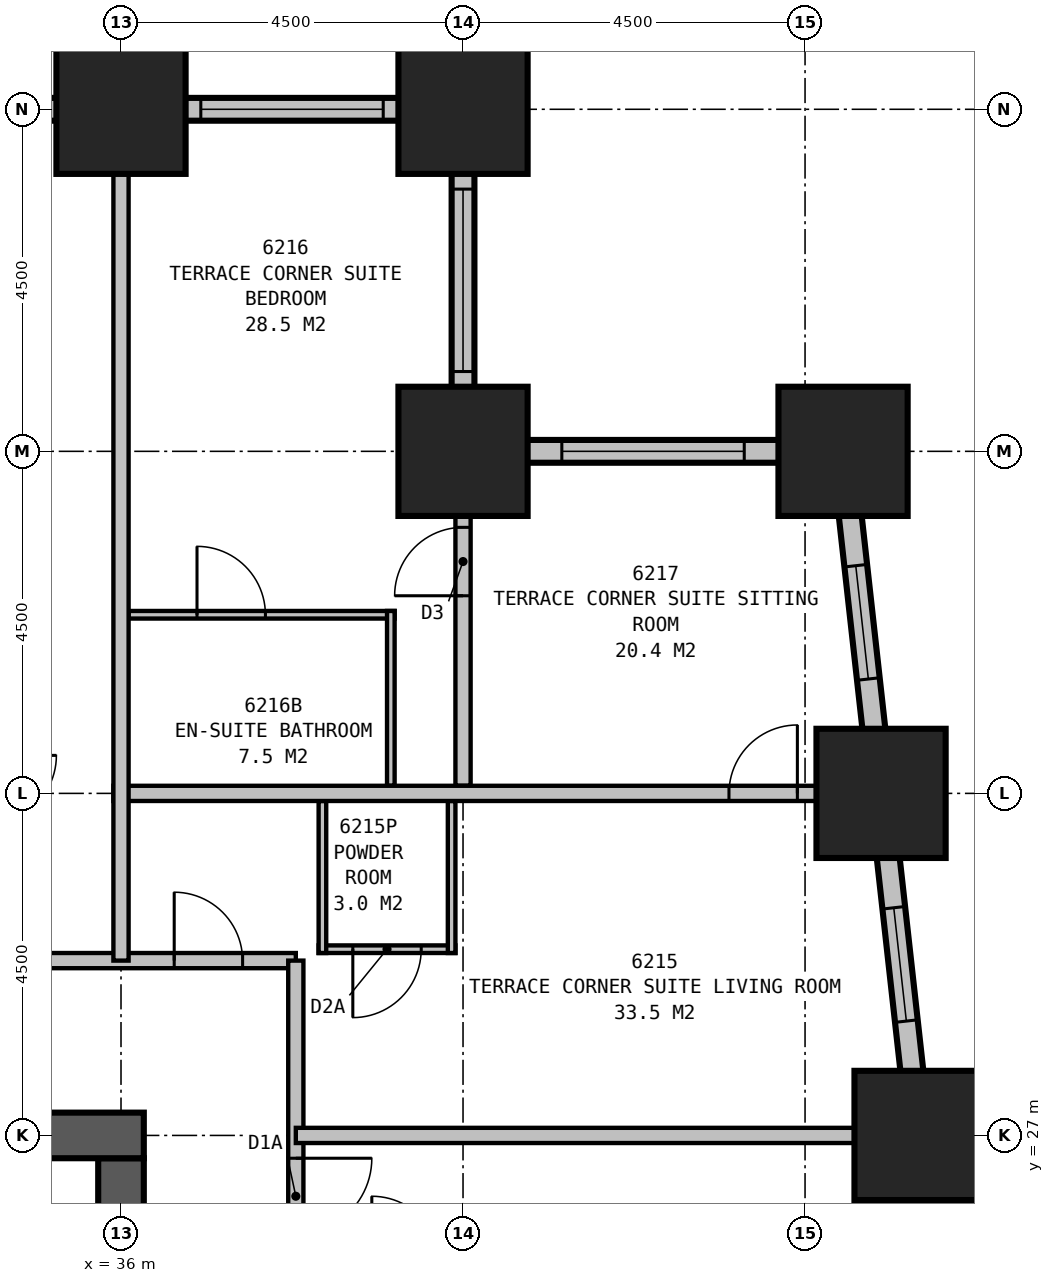
"""IFC4 building model, lengths in metres.
Left out: names, types, materials, properties, quantities, classifications, styles, units other than length and angle.
Written with IfcOpenShell. Run it as: python <this file> out.ifc"""

import sys

from ifc_helpers import new_model, si_unit, direction, frame, frame_2d, origin, origin_2d, place, context, subcontext, project, spatial, rectangle, extrude, element, fill, save


model = new_model("IFC4")
c1 = context("Model", 3, precision=1e-05, world=origin(), true_north=direction((0.0, 1.0)))
c2 = subcontext(c1, "Body", "Model", "MODEL_VIEW")
j1 = project(units=[si_unit("LENGTHUNIT", "METRE"), si_unit("PLANEANGLEUNIT", "RADIAN")], contexts=[c1])
p1 = place(None, origin())
s1 = spatial("IfcSite", under=j1, at=p1, CompositionType="ELEMENT")
p2 = place(p1, origin())
s2 = spatial("IfcBuilding", under=s1, at=p2, CompositionType="ELEMENT")
p3 = place(p2, frame((0.0, 0.0, 240.8)))
s3 = spatial("IfcBuildingStorey", under=s2, at=p3, CompositionType="ELEMENT", Elevation=240.8)
for number, where, z_axis, x_axis in (
    (1, (46.5, 27.0, 0.0), (0.0, 0.0, 1.0), (1.0, 0.0, 0.0)),
    (2, (46.0, 31.5, 0.0), (0.0, 0.0, 1.0), (1.0, 0.0, 0.0)),
    (3, (45.5, 36.0, 0.0), (0.0, 0.0, 1.0), (1.0, 0.0, 0.0)),
    (4, (40.5, 36.0, 0.0), (0.0, 0.0, 1.0), (1.0, 0.0, 0.0)),
    (5, (40.5, 40.5, 0.0), (0.0, 0.0, 1.0), (1.0, 0.0, 0.0)),
    (6, (36.0, 40.5, 0.0), (0.0, 0.0, 1.0), (1.0, 0.0, 0.0)),
):
    element("IfcColumn", number, at=place(p3, frame(where, z_axis=z_axis, x_axis=x_axis)), inside=s3, PredefinedType="COLUMN", context=c2, shape_type="SweptSolid", body=[
        extrude(rectangle(XDim=1.7, YDim=1.7, at=origin_2d()), origin(), (0.0, 0.0, 1.0), 3.9),
    ])
p4 = place(p3, frame((36.3, 27.0, 0.0), z_axis=(0.0, 0.0, 1.0), x_axis=(-1.0, 0.0, 0.0)))
e7 = element("IfcWall", 7, at=p4, inside=s3, PredefinedType="SHEAR", context=c2, shape_type="SweptSolid", body=[
    extrude(rectangle(XDim=23.45, YDim=0.6, at=frame_2d((11.725, 0.0))), origin(), (0.0, 0.0, 1.0), 3.9),
])
p5 = place(p4, frame((17.05, 0.0, 0.0)))
e8 = element("IfcOpeningElement", 8, at=p5, cuts=e7, PredefinedType="OPENING", context=c2, shape_type="SweptSolid", body=[
    extrude(rectangle(XDim=1.0, YDim=2.1, at=frame_2d((0.5, 1.05))), frame((0.0, 0.31, 0.0), z_axis=(0.0, -1.0, 0.0), x_axis=(1.0, 0.0, 0.0)), (0.0, 0.0, 1.0), 0.62),
])
p6 = place(p4, frame((12.05, 0.0, 0.0)))
e9 = element("IfcOpeningElement", 9, at=p6, cuts=e7, PredefinedType="OPENING", context=c2, shape_type="SweptSolid", body=[
    extrude(rectangle(XDim=1.0, YDim=2.1, at=frame_2d((0.5, 1.05))), frame((0.0, 0.31, 0.0), z_axis=(0.0, -1.0, 0.0), x_axis=(1.0, 0.0, 0.0)), (0.0, 0.0, 1.0), 0.62),
])
p7 = place(p4, frame((7.05, 0.0, 0.0)))
e10 = element("IfcOpeningElement", 10, at=p7, cuts=e7, PredefinedType="OPENING", context=c2, shape_type="SweptSolid", body=[
    extrude(rectangle(XDim=1.0, YDim=2.1, at=frame_2d((0.5, 1.05))), frame((0.0, 0.31, 0.0), z_axis=(0.0, -1.0, 0.0), x_axis=(1.0, 0.0, 0.0)), (0.0, 0.0, 1.0), 0.62),
])
p8 = place(p3, frame((36.0, 20.0, 0.0), z_axis=(0.0, 0.0, 1.0), x_axis=(0.0, 1.0, 0.0)))
e11 = element("IfcWall", 11, at=p8, inside=s3, PredefinedType="SHEAR", context=c2, shape_type="SweptSolid", body=[
    extrude(rectangle(XDim=6.7, YDim=0.6, at=frame_2d((3.35, 0.0))), origin(), (0.0, 0.0, 1.0), 3.9),
])
p9 = place(p3, frame((49.017, 4.351, 0.0), z_axis=(0.0, 0.0, 1.0), x_axis=(-0.110433201132, 0.993883548555, 0.0)))
e12 = element("IfcWall", 12, at=p9, inside=s3, PredefinedType="STANDARD", context=c2, shape_type="SweptSolid", body=[
    extrude(rectangle(XDim=31.994, YDim=0.3, at=frame_2d((15.997, 0.0))), origin(), (0.0, 0.0, 1.0), 2.45),
])
p10 = place(p9, frame((1.664, 0.0, 0.5)))
e13 = element("IfcOpeningElement", 13, at=p10, cuts=e12, PredefinedType="OPENING", context=c2, shape_type="SweptSolid", body=[
    extrude(rectangle(XDim=1.5, YDim=1.75, at=frame_2d((0.75, 0.875))), frame((0.0, 0.16, 0.0), z_axis=(0.0, -1.0, 0.0), x_axis=(1.0, 0.0, 0.0)), (0.0, 0.0, 1.0), 0.32),
])
p11 = place(p9, frame((6.192, 0.0, 0.5)))
e14 = element("IfcOpeningElement", 14, at=p11, cuts=e12, PredefinedType="OPENING", context=c2, shape_type="SweptSolid", body=[
    extrude(rectangle(XDim=1.5, YDim=1.75, at=frame_2d((0.75, 0.875))), frame((0.0, 0.16, 0.0), z_axis=(0.0, -1.0, 0.0), x_axis=(1.0, 0.0, 0.0)), (0.0, 0.0, 1.0), 0.32),
])
p12 = place(p9, frame((10.719, 0.0, 0.5)))
e15 = element("IfcOpeningElement", 15, at=p12, cuts=e12, PredefinedType="OPENING", context=c2, shape_type="SweptSolid", body=[
    extrude(rectangle(XDim=1.5, YDim=1.75, at=frame_2d((0.75, 0.875))), frame((0.0, 0.16, 0.0), z_axis=(0.0, -1.0, 0.0), x_axis=(1.0, 0.0, 0.0)), (0.0, 0.0, 1.0), 0.32),
])
p13 = place(p9, frame((15.247, 0.0, 0.5)))
e16 = element("IfcOpeningElement", 16, at=p13, cuts=e12, PredefinedType="OPENING", context=c2, shape_type="SweptSolid", body=[
    extrude(rectangle(XDim=1.5, YDim=1.75, at=frame_2d((0.75, 0.875))), frame((0.0, 0.16, 0.0), z_axis=(0.0, -1.0, 0.0), x_axis=(1.0, 0.0, 0.0)), (0.0, 0.0, 1.0), 0.32),
])
p14 = place(p9, frame((19.775, 0.0, 0.5)))
e17 = element("IfcOpeningElement", 17, at=p14, cuts=e12, PredefinedType="OPENING", context=c2, shape_type="SweptSolid", body=[
    extrude(rectangle(XDim=1.5, YDim=1.75, at=frame_2d((0.75, 0.875))), frame((0.0, 0.16, 0.0), z_axis=(0.0, -1.0, 0.0), x_axis=(1.0, 0.0, 0.0)), (0.0, 0.0, 1.0), 0.32),
])
p15 = place(p9, frame((24.302, 0.0, 0.5)))
e18 = element("IfcOpeningElement", 18, at=p15, cuts=e12, PredefinedType="OPENING", context=c2, shape_type="SweptSolid", body=[
    extrude(rectangle(XDim=1.5, YDim=1.75, at=frame_2d((0.75, 0.875))), frame((0.0, 0.16, 0.0), z_axis=(0.0, -1.0, 0.0), x_axis=(1.0, 0.0, 0.0)), (0.0, 0.0, 1.0), 0.32),
])
p16 = place(p9, frame((28.83, 0.0, 0.5)))
e19 = element("IfcOpeningElement", 19, at=p16, cuts=e12, PredefinedType="OPENING", context=c2, shape_type="SweptSolid", body=[
    extrude(rectangle(XDim=1.5, YDim=1.75, at=frame_2d((0.75, 0.875))), frame((0.0, 0.16, 0.0), z_axis=(0.0, -1.0, 0.0), x_axis=(1.0, 0.0, 0.0)), (0.0, 0.0, 1.0), 0.32),
])
p17 = place(p3, frame((45.65, 36.0, 0.0), z_axis=(0.0, 0.0, 1.0), x_axis=(-1.0, 0.0, 0.0)))
e20 = element("IfcWall", 20, at=p17, inside=s3, PredefinedType="STANDARD", context=c2, shape_type="SweptSolid", body=[
    extrude(rectangle(XDim=5.3, YDim=0.3, at=frame_2d((2.65, 0.0))), origin(), (0.0, 0.0, 1.0), 2.45),
])
p18 = place(p17, frame((1.45, 0.0, 0.5)))
e21 = element("IfcOpeningElement", 21, at=p18, cuts=e20, PredefinedType="OPENING", context=c2, shape_type="SweptSolid", body=[
    extrude(rectangle(XDim=2.4, YDim=1.75, at=frame_2d((1.2, 0.875))), frame((0.0, 0.16, 0.0), z_axis=(0.0, -1.0, 0.0), x_axis=(1.0, 0.0, 0.0)), (0.0, 0.0, 1.0), 0.32),
])
p19 = place(p3, frame((40.5, 35.85, 0.0), z_axis=(0.0, 0.0, 1.0), x_axis=(0.0, 1.0, 0.0)))
e22 = element("IfcWall", 22, at=p19, inside=s3, PredefinedType="STANDARD", context=c2, shape_type="SweptSolid", body=[
    extrude(rectangle(XDim=4.8, YDim=0.3, at=frame_2d((2.4, 0.0))), origin(), (0.0, 0.0, 1.0), 2.45),
])
p20 = place(p19, frame((1.2, 0.0, 0.5)))
e23 = element("IfcOpeningElement", 23, at=p20, cuts=e22, PredefinedType="OPENING", context=c2, shape_type="SweptSolid", body=[
    extrude(rectangle(XDim=2.4, YDim=1.75, at=frame_2d((1.2, 0.875))), frame((0.0, 0.16, 0.0), z_axis=(0.0, -1.0, 0.0), x_axis=(1.0, 0.0, 0.0)), (0.0, 0.0, 1.0), 0.32),
])
p21 = place(p3, frame((40.65, 40.5, 0.0), z_axis=(0.0, 0.0, 1.0), x_axis=(-1.0, 0.0, 0.0)))
e24 = element("IfcWall", 24, at=p21, inside=s3, PredefinedType="STANDARD", context=c2, shape_type="SweptSolid", body=[
    extrude(rectangle(XDim=27.3, YDim=0.3, at=frame_2d((13.65, 0.0))), origin(), (0.0, 0.0, 1.0), 2.45),
])
p22 = place(p21, frame((1.2, 0.0, 0.5)))
e25 = element("IfcOpeningElement", 25, at=p22, cuts=e24, PredefinedType="OPENING", context=c2, shape_type="SweptSolid", body=[
    extrude(rectangle(XDim=2.4, YDim=1.75, at=frame_2d((1.2, 0.875))), frame((0.0, 0.16, 0.0), z_axis=(0.0, -1.0, 0.0), x_axis=(1.0, 0.0, 0.0)), (0.0, 0.0, 1.0), 0.32),
])
p23 = place(p21, frame((5.7, 0.0, 0.5)))
e26 = element("IfcOpeningElement", 26, at=p23, cuts=e24, PredefinedType="OPENING", context=c2, shape_type="SweptSolid", body=[
    extrude(rectangle(XDim=2.4, YDim=1.75, at=frame_2d((1.2, 0.875))), frame((0.0, 0.16, 0.0), z_axis=(0.0, -1.0, 0.0), x_axis=(1.0, 0.0, 0.0)), (0.0, 0.0, 1.0), 0.32),
])
p24 = place(p21, frame((10.2, 0.0, 0.5)))
e27 = element("IfcOpeningElement", 27, at=p24, cuts=e24, PredefinedType="OPENING", context=c2, shape_type="SweptSolid", body=[
    extrude(rectangle(XDim=2.4, YDim=1.75, at=frame_2d((1.2, 0.875))), frame((0.0, 0.16, 0.0), z_axis=(0.0, -1.0, 0.0), x_axis=(1.0, 0.0, 0.0)), (0.0, 0.0, 1.0), 0.32),
])
p25 = place(p21, frame((14.7, 0.0, 0.5)))
e28 = element("IfcOpeningElement", 28, at=p25, cuts=e24, PredefinedType="OPENING", context=c2, shape_type="SweptSolid", body=[
    extrude(rectangle(XDim=2.4, YDim=1.75, at=frame_2d((1.2, 0.875))), frame((0.0, 0.16, 0.0), z_axis=(0.0, -1.0, 0.0), x_axis=(1.0, 0.0, 0.0)), (0.0, 0.0, 1.0), 0.32),
])
p26 = place(p21, frame((19.2, 0.0, 0.5)))
e29 = element("IfcOpeningElement", 29, at=p26, cuts=e24, PredefinedType="OPENING", context=c2, shape_type="SweptSolid", body=[
    extrude(rectangle(XDim=2.4, YDim=1.75, at=frame_2d((1.2, 0.875))), frame((0.0, 0.16, 0.0), z_axis=(0.0, -1.0, 0.0), x_axis=(1.0, 0.0, 0.0)), (0.0, 0.0, 1.0), 0.32),
])
p27 = place(p21, frame((23.7, 0.0, 0.5)))
e30 = element("IfcOpeningElement", 30, at=p27, cuts=e24, PredefinedType="OPENING", context=c2, shape_type="SweptSolid", body=[
    extrude(rectangle(XDim=2.4, YDim=1.75, at=frame_2d((1.2, 0.875))), frame((0.0, 0.16, 0.0), z_axis=(0.0, -1.0, 0.0), x_axis=(1.0, 0.0, 0.0)), (0.0, 0.0, 1.0), 0.32),
])
p28 = place(p3, frame((12.406, 29.3, 0.0), z_axis=(0.0, 0.0, 1.0), x_axis=(1.0, 0.0, 0.0)))
e31 = element("IfcWall", 31, at=p28, inside=s3, PredefinedType="PARTITIONING", context=c2, shape_type="SweptSolid", body=[
    extrude(rectangle(XDim=25.894, YDim=0.2, at=frame_2d((12.947, 0.0))), origin(), (0.0, 0.0, 1.0), 3.65),
])
p29 = place(p28, frame((0.9, 0.0, 0.0)))
e32 = element("IfcOpeningElement", 32, at=p29, cuts=e31, PredefinedType="OPENING", context=c2, shape_type="SweptSolid", body=[
    extrude(rectangle(XDim=0.9, YDim=2.1, at=frame_2d((0.45, 1.05))), frame((0.0, 0.11, 0.0), z_axis=(0.0, -1.0, 0.0), x_axis=(1.0, 0.0, 0.0)), (0.0, 0.0, 1.0), 0.22),
])
p30 = place(p28, frame((6.444, 0.0, 0.0)))
e33 = element("IfcOpeningElement", 33, at=p30, cuts=e31, PredefinedType="OPENING", context=c2, shape_type="SweptSolid", body=[
    extrude(rectangle(XDim=0.9, YDim=2.1, at=frame_2d((0.45, 1.05))), frame((0.0, 0.11, 0.0), z_axis=(0.0, -1.0, 0.0), x_axis=(1.0, 0.0, 0.0)), (0.0, 0.0, 1.0), 0.22),
])
p31 = place(p28, frame((14.644, 0.0, 0.0)))
e34 = element("IfcOpeningElement", 34, at=p31, cuts=e31, PredefinedType="OPENING", context=c2, shape_type="SweptSolid", body=[
    extrude(rectangle(XDim=0.9, YDim=2.1, at=frame_2d((0.45, 1.05))), frame((0.0, 0.11, 0.0), z_axis=(0.0, -1.0, 0.0), x_axis=(1.0, 0.0, 0.0)), (0.0, 0.0, 1.0), 0.22),
])
p32 = place(p28, frame((24.293, 0.0, 0.0)))
e35 = element("IfcOpeningElement", 35, at=p32, cuts=e31, PredefinedType="OPENING", context=c2, shape_type="SweptSolid", body=[
    extrude(rectangle(XDim=0.9, YDim=2.1, at=frame_2d((0.45, 1.05))), frame((0.0, 0.11, 0.0), z_axis=(0.0, -1.0, 0.0), x_axis=(1.0, 0.0, 0.0)), (0.0, 0.0, 1.0), 0.22),
])
p33 = place(p3, frame((38.3, 10.6, 0.0), z_axis=(0.0, 0.0, 1.0), x_axis=(0.0, 1.0, 0.0)))
e36 = element("IfcWall", 36, at=p33, inside=s3, PredefinedType="PARTITIONING", context=c2, shape_type="SweptSolid", body=[
    extrude(rectangle(XDim=18.7, YDim=0.2, at=frame_2d((9.35, 0.0))), origin(), (0.0, 0.0, 1.0), 3.65),
])
p34 = place(p33, frame((6.55, 0.0, 0.0), z_axis=(0.0, 0.0, 1.0), x_axis=(-1.0, 0.0, 0.0)))
e37 = element("IfcOpeningElement", 37, at=p34, cuts=e36, PredefinedType="OPENING", context=c2, shape_type="SweptSolid", body=[
    extrude(rectangle(XDim=0.9, YDim=2.1, at=frame_2d((0.45, 1.05))), frame((0.0, 0.11, 0.0), z_axis=(0.0, -1.0, 0.0), x_axis=(1.0, 0.0, 0.0)), (0.0, 0.0, 1.0), 0.22),
])
p35 = place(p33, frame((16.1, 0.0, 0.0), z_axis=(0.0, 0.0, 1.0), x_axis=(-1.0, 0.0, 0.0)))
e38 = element("IfcOpeningElement", 38, at=p35, cuts=e36, PredefinedType="OPENING", context=c2, shape_type="SweptSolid", body=[
    extrude(rectangle(XDim=1.0, YDim=2.1, at=frame_2d((0.5, 1.05))), frame((0.0, 0.11, 0.0), z_axis=(0.0, -1.0, 0.0), x_axis=(1.0, 0.0, 0.0)), (0.0, 0.0, 1.0), 0.22),
])
p36 = place(p3, frame((38.3, 27.0, 0.0), z_axis=(0.0, 0.0, 1.0), x_axis=(1.0, 0.0, 0.0)))
e39 = element("IfcWall", 39, at=p36, inside=s3, PredefinedType="PARTITIONING", context=c2, shape_type="SweptSolid", body=[
    extrude(rectangle(XDim=7.977, YDim=0.2, at=frame_2d((3.988, 0.0))), origin(), (0.0, 0.0, 1.0), 2.3),
])
p37 = place(p3, frame((36.0, 29.3, 0.0), z_axis=(0.0, 0.0, 1.0), x_axis=(0.0, 1.0, 0.0)))
e40 = element("IfcWall", 40, at=p37, inside=s3, PredefinedType="PARTITIONING", context=c2, shape_type="SweptSolid", body=[
    extrude(rectangle(XDim=11.2, YDim=0.2, at=frame_2d((5.6, 0.0))), origin(), (0.0, 0.0, 1.0), 2.6),
])
p38 = place(p3, frame((35.9, 31.5, 0.0), z_axis=(0.0, 0.0, 1.0), x_axis=(1.0, 0.0, 0.0)))
e41 = element("IfcWall", 41, at=p38, inside=s3, PredefinedType="PARTITIONING", context=c2, shape_type="SweptSolid", body=[
    extrude(rectangle(XDim=10.099, YDim=0.2, at=frame_2d((5.05, 0.0))), origin(), (0.0, 0.0, 1.0), 3.65),
])
p39 = place(p38, frame((8.099, 0.0, 0.0)))
e42 = element("IfcOpeningElement", 42, at=p39, cuts=e41, PredefinedType="OPENING", context=c2, shape_type="SweptSolid", body=[
    extrude(rectangle(XDim=0.9, YDim=2.1, at=frame_2d((0.45, 1.05))), frame((0.0, 0.11, 0.0), z_axis=(0.0, -1.0, 0.0), x_axis=(1.0, 0.0, 0.0)), (0.0, 0.0, 1.0), 0.22),
])
p40 = place(p3, frame((40.35, 31.4, 0.0), z_axis=(0.0, 0.0, 1.0), x_axis=(0.0, -1.0, 0.0)))
e43 = element("IfcWall", 43, at=p40, inside=s3, PredefinedType="PLUMBINGWALL", context=c2, shape_type="SweptSolid", body=[
    extrude(rectangle(XDim=2.0, YDim=0.1, at=frame_2d((1.0, 0.0))), origin(), (0.0, 0.0, 1.0), 2.6),
])
p41 = place(p3, frame((38.65, 31.4, 0.0), z_axis=(0.0, 0.0, 1.0), x_axis=(0.0, -1.0, 0.0)))
e44 = element("IfcWall", 44, at=p41, inside=s3, PredefinedType="PLUMBINGWALL", context=c2, shape_type="SweptSolid", body=[
    extrude(rectangle(XDim=2.0, YDim=0.1, at=frame_2d((1.0, 0.0))), origin(), (0.0, 0.0, 1.0), 3.65),
])
p42 = place(p3, frame((38.6, 29.45, 0.0), z_axis=(0.0, 0.0, 1.0), x_axis=(1.0, 0.0, 0.0)))
e45 = element("IfcWall", 45, at=p42, inside=s3, PredefinedType="PLUMBINGWALL", context=c2, shape_type="SweptSolid", body=[
    extrude(rectangle(XDim=1.8, YDim=0.1, at=frame_2d((0.9, 0.0))), origin(), (0.0, 0.0, 1.0), 3.65),
])
p43 = place(p42, frame((1.35, 0.0, 0.0), z_axis=(0.0, 0.0, 1.0), x_axis=(-1.0, 0.0, 0.0)))
e46 = element("IfcOpeningElement", 46, at=p43, cuts=e45, PredefinedType="OPENING", context=c2, shape_type="SweptSolid", body=[
    extrude(rectangle(XDim=0.9, YDim=2.1, at=frame_2d((0.45, 1.05))), frame((0.0, 0.06, 0.0), z_axis=(0.0, -1.0, 0.0), x_axis=(1.0, 0.0, 0.0)), (0.0, 0.0, 1.0), 0.12),
])
p44 = place(p3, frame((40.5, 31.6, 0.0), z_axis=(0.0, 0.0, 1.0), x_axis=(0.0, 1.0, 0.0)))
e47 = element("IfcWall", 47, at=p44, inside=s3, PredefinedType="PARTITIONING", context=c2, shape_type="SweptSolid", body=[
    extrude(rectangle(XDim=4.4, YDim=0.2, at=frame_2d((2.2, 0.0))), origin(), (0.0, 0.0, 1.0), 2.6),
])
p45 = place(p44, frame((2.5, 0.0, 0.0)))
e48 = element("IfcOpeningElement", 48, at=p45, cuts=e47, PredefinedType="OPENING", context=c2, shape_type="SweptSolid", body=[
    extrude(rectangle(XDim=0.9, YDim=2.1, at=frame_2d((0.45, 1.05))), frame((0.0, 0.11, 0.0), z_axis=(0.0, -1.0, 0.0), x_axis=(1.0, 0.0, 0.0)), (0.0, 0.0, 1.0), 0.22),
])
p46 = place(p3, frame((39.55, 31.6, 0.0), z_axis=(0.0, 0.0, 1.0), x_axis=(0.0, 1.0, 0.0)))
e49 = element("IfcWall", 49, at=p46, inside=s3, PredefinedType="PLUMBINGWALL", context=c2, shape_type="SweptSolid", body=[
    extrude(rectangle(XDim=2.3, YDim=0.1, at=frame_2d((1.15, 0.0))), origin(), (0.0, 0.0, 1.0), 3.65),
])
p47 = place(p3, frame((36.1, 33.85, 0.0), z_axis=(0.0, 0.0, 1.0), x_axis=(1.0, 0.0, 0.0)))
e50 = element("IfcWall", 50, at=p47, inside=s3, PredefinedType="PLUMBINGWALL", context=c2, shape_type="SweptSolid", body=[
    extrude(rectangle(XDim=3.5, YDim=0.1, at=frame_2d((1.75, 0.0))), origin(), (0.0, 0.0, 1.0), 3.65),
])
p48 = place(p47, frame((0.9, 0.0, 0.0)))
e51 = element("IfcOpeningElement", 51, at=p48, cuts=e50, PredefinedType="OPENING", context=c2, shape_type="SweptSolid", body=[
    extrude(rectangle(XDim=0.9, YDim=2.1, at=frame_2d((0.45, 1.05))), frame((0.0, 0.06, 0.0), z_axis=(0.0, -1.0, 0.0), x_axis=(1.0, 0.0, 0.0)), (0.0, 0.0, 1.0), 0.12),
])
p49 = place(p15, origin())
e52 = element("IfcWindow", 52, at=p49, inside=s3, PartitioningType="SINGLE_PANEL", PredefinedType="WINDOW", context=c2, shape_type="SweptSolid", body=[
    extrude(rectangle(XDim=1.5, YDim=1.75, at=frame_2d((0.75, 0.875))), frame((0.0, 0.03, 0.0), z_axis=(0.0, -1.0, 0.0), x_axis=(1.0, 0.0, 0.0)), (0.0, 0.0, 1.0), 0.06),
])
fill(e18, e52)
p50 = place(p16, origin())
e53 = element("IfcWindow", 53, at=p50, inside=s3, PartitioningType="SINGLE_PANEL", PredefinedType="WINDOW", context=c2, shape_type="SweptSolid", body=[
    extrude(rectangle(XDim=1.5, YDim=1.75, at=frame_2d((0.75, 0.875))), frame((0.0, 0.03, 0.0), z_axis=(0.0, -1.0, 0.0), x_axis=(1.0, 0.0, 0.0)), (0.0, 0.0, 1.0), 0.06),
])
fill(e19, e53)
p51 = place(p18, origin())
e54 = element("IfcWindow", 54, at=p51, inside=s3, PartitioningType="SINGLE_PANEL", PredefinedType="WINDOW", context=c2, shape_type="SweptSolid", body=[
    extrude(rectangle(XDim=2.4, YDim=1.75, at=frame_2d((1.2, 0.875))), frame((0.0, 0.03, 0.0), z_axis=(0.0, -1.0, 0.0), x_axis=(1.0, 0.0, 0.0)), (0.0, 0.0, 1.0), 0.06),
])
fill(e21, e54)
p52 = place(p20, origin())
e55 = element("IfcWindow", 55, at=p52, inside=s3, PartitioningType="SINGLE_PANEL", PredefinedType="WINDOW", context=c2, shape_type="SweptSolid", body=[
    extrude(rectangle(XDim=2.4, YDim=1.75, at=frame_2d((1.2, 0.875))), frame((0.0, 0.03, 0.0), z_axis=(0.0, -1.0, 0.0), x_axis=(1.0, 0.0, 0.0)), (0.0, 0.0, 1.0), 0.06),
])
fill(e23, e55)
p53 = place(p22, origin())
e56 = element("IfcWindow", 56, at=p53, inside=s3, PartitioningType="SINGLE_PANEL", PredefinedType="WINDOW", context=c2, shape_type="SweptSolid", body=[
    extrude(rectangle(XDim=2.4, YDim=1.75, at=frame_2d((1.2, 0.875))), frame((0.0, 0.03, 0.0), z_axis=(0.0, -1.0, 0.0), x_axis=(1.0, 0.0, 0.0)), (0.0, 0.0, 1.0), 0.06),
])
fill(e25, e56)
p54 = place(p32, origin())
e57 = element("IfcDoor", 57, at=p54, inside=s3, OperationType="SINGLE_SWING_LEFT", PredefinedType="DOOR", context=c2, shape_type="SweptSolid", body=[
    extrude(rectangle(XDim=0.9, YDim=2.1, at=frame_2d((0.45, 1.05))), frame((0.0, 0.025, 0.0), z_axis=(0.0, -1.0, 0.0), x_axis=(1.0, 0.0, 0.0)), (0.0, 0.0, 1.0), 0.05),
])
fill(e35, e57)
p55 = place(p35, origin())
e58 = element("IfcDoor", 58, at=p55, inside=s3, OperationType="SINGLE_SWING_LEFT", PredefinedType="DOOR", context=c2, shape_type="SweptSolid", body=[
    extrude(rectangle(XDim=1.0, YDim=2.1, at=frame_2d((0.5, 1.05))), frame((0.0, 0.025, 0.0), z_axis=(0.0, -1.0, 0.0), x_axis=(1.0, 0.0, 0.0)), (0.0, 0.0, 1.0), 0.05),
])
fill(e38, e58)
p56 = place(p39, origin())
e59 = element("IfcDoor", 59, at=p56, inside=s3, OperationType="SINGLE_SWING_RIGHT", PredefinedType="DOOR", context=c2, shape_type="SweptSolid", body=[
    extrude(rectangle(XDim=0.9, YDim=2.1, at=frame_2d((0.45, 1.05))), frame((0.0, 0.025, 0.0), z_axis=(0.0, -1.0, 0.0), x_axis=(1.0, 0.0, 0.0)), (0.0, 0.0, 1.0), 0.05),
])
fill(e42, e59)
p57 = place(p43, origin())
e60 = element("IfcDoor", 60, at=p57, inside=s3, OperationType="SINGLE_SWING_RIGHT", PredefinedType="DOOR", context=c2, shape_type="SweptSolid", body=[
    extrude(rectangle(XDim=0.9, YDim=2.1, at=frame_2d((0.45, 1.05))), frame((0.0, 0.025, 0.0), z_axis=(0.0, -1.0, 0.0), x_axis=(1.0, 0.0, 0.0)), (0.0, 0.0, 1.0), 0.05),
])
fill(e46, e60)
p58 = place(p45, origin())
e61 = element("IfcDoor", 61, at=p58, inside=s3, OperationType="SINGLE_SWING_LEFT", PredefinedType="DOOR", context=c2, shape_type="SweptSolid", body=[
    extrude(rectangle(XDim=0.9, YDim=2.1, at=frame_2d((0.45, 1.05))), frame((0.0, 0.025, 0.0), z_axis=(0.0, -1.0, 0.0), x_axis=(1.0, 0.0, 0.0)), (0.0, 0.0, 1.0), 0.05),
])
fill(e48, e61)
p59 = place(p48, origin())
e62 = element("IfcDoor", 62, at=p59, inside=s3, OperationType="SINGLE_SWING_LEFT", PredefinedType="DOOR", context=c2, shape_type="SweptSolid", body=[
    extrude(rectangle(XDim=0.9, YDim=2.1, at=frame_2d((0.45, 1.05))), frame((0.0, 0.025, 0.0), z_axis=(0.0, -1.0, 0.0), x_axis=(1.0, 0.0, 0.0)), (0.0, 0.0, 1.0), 0.05),
])
fill(e51, e62)
save(model, sys.argv[1])
